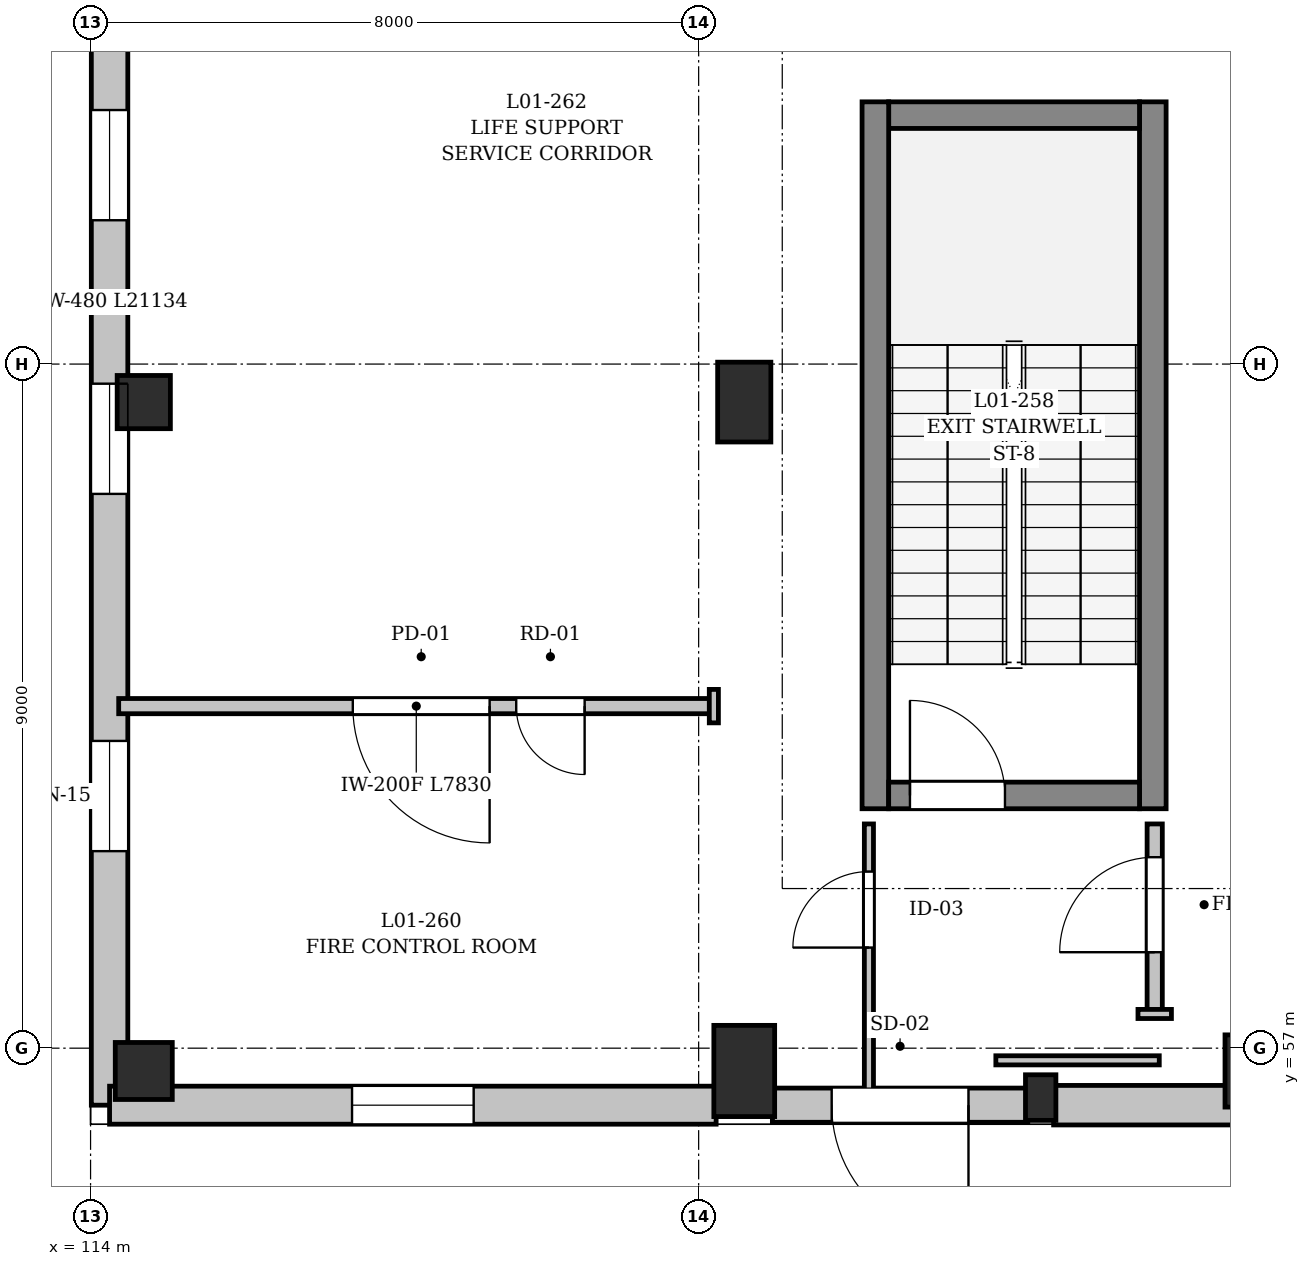
"""IFC4 building model, lengths in metres.
Left out: names, types, materials, properties, quantities, classifications, styles, units other than length and angle.
Written with IfcOpenShell. Run it as: python <this file> out.ifc"""

import sys

from ifc_helpers import new_model, si_unit, direction, frame, frame_2d, origin, origin_2d, place, context, subcontext, project, spatial, rectangle, extrude, element, fill, save


model = new_model("IFC4")
c1 = context("Model", 3, precision=1e-05, world=origin(), true_north=direction((0.0, 1.0)))
c2 = subcontext(c1, "Body", "Model", "MODEL_VIEW")
j1 = project(units=[si_unit("LENGTHUNIT", "METRE"), si_unit("PLANEANGLEUNIT", "RADIAN")], contexts=[c1])
p1 = place(None, origin())
s1 = spatial("IfcSite", under=j1, at=p1, CompositionType="ELEMENT")
p2 = place(p1, origin())
s2 = spatial("IfcBuilding", under=s1, at=p2, CompositionType="ELEMENT")
p3 = place(p2, origin())
s3 = spatial("IfcBuildingStorey", under=s2, at=p3, CompositionType="ELEMENT", Elevation=0.0)
p4 = place(p3, frame((114.7, 56.7, 0.0), z_axis=(0.0, 0.0, 1.0), x_axis=(1.0, 0.0, 0.0)))
e1 = element("IfcColumn", 1, at=p4, inside=s3, PredefinedType="COLUMN", context=c2, shape_type="SweptSolid", body=[
    extrude(rectangle(XDim=0.75, YDim=0.75, at=origin_2d()), origin(), (0.0, 0.0, 1.0), 5.05),
])
p5 = place(p3, frame((114.7, 65.5, 0.0), z_axis=(0.0, 0.0, 1.0), x_axis=(1.0, 0.0, 0.0)))
e2 = element("IfcColumn", 2, at=p5, inside=s3, PredefinedType="COLUMN", context=c2, shape_type="SweptSolid", body=[
    extrude(rectangle(XDim=0.7, YDim=0.7, at=origin_2d()), origin(), (0.0, 0.0, 1.0), 5.05),
])
p6 = place(p3, frame((122.6, 56.7, 0.0), z_axis=(0.0, 0.0, 1.0), x_axis=(1.0, 0.0, 0.0)))
e3 = element("IfcColumn", 3, at=p6, inside=s3, PredefinedType="COLUMN", context=c2, shape_type="SweptSolid", body=[
    extrude(rectangle(XDim=0.8, YDim=1.2, at=origin_2d()), origin(), (0.0, 0.0, 1.0), 5.05),
])
p7 = place(p3, frame((122.6, 65.5, 0.0), z_axis=(0.0, 0.0, 1.0), x_axis=(1.0, 0.0, 0.0)))
e4 = element("IfcColumn", 4, at=p7, inside=s3, PredefinedType="COLUMN", context=c2, shape_type="SweptSolid", body=[
    extrude(rectangle(XDim=0.7, YDim=1.05, at=origin_2d()), origin(), (0.0, 0.0, 1.0), 5.05),
])
p8 = place(p3, frame((129.4, 56.7, 0.0), z_axis=(0.0, 0.0, 1.0), x_axis=(1.0, 0.0, 0.0)))
e5 = element("IfcColumn", 5, at=p8, inside=s3, PredefinedType="COLUMN", context=c2, shape_type="SweptSolid", body=[
    extrude(rectangle(XDim=0.95, YDim=0.95, at=origin_2d()), origin(), (0.0, 0.0, 1.0), 5.05),
])
p9 = place(p3, frame((126.5, 56.35, 0.0), z_axis=(0.0, 0.0, 1.0), x_axis=(1.0, 0.0, 0.0)))
e6 = element("IfcColumn", 6, at=p9, inside=s3, PredefinedType="PILASTER", context=c2, shape_type="SweptSolid", body=[
    extrude(rectangle(XDim=0.4, YDim=0.6, at=origin_2d()), origin(), (0.0, 0.0, 1.0), 5.05),
])
p10 = place(p3, frame((114.25, 56.25, 0.0), z_axis=(0.0, 0.0, 1.0), x_axis=(0.0, 1.0, 0.0)))
e7 = element("IfcWall", 7, at=p10, inside=s3, PredefinedType="SOLIDWALL", context=c2, shape_type="SweptSolid", body=[
    extrude(rectangle(XDim=21.134, YDim=0.48, at=frame_2d((10.567, 0.0))), origin(), (0.0, 0.0, 1.0), 3.84),
])
p11 = place(p10, frame((3.342, 0.0, 0.9)))
e8 = element("IfcOpeningElement", 8, at=p11, cuts=e7, PredefinedType="OPENING", context=c2, shape_type="SweptSolid", body=[
    extrude(rectangle(XDim=1.45, YDim=1.5, at=frame_2d((0.725, 0.75))), frame((0.0, 0.25, 0.0), z_axis=(0.0, -1.0, 0.0), x_axis=(1.0, 0.0, 0.0)), (0.0, 0.0, 1.0), 0.5),
])
p12 = place(p10, frame((8.042, 0.0, 0.9)))
e9 = element("IfcOpeningElement", 9, at=p12, cuts=e7, PredefinedType="OPENING", context=c2, shape_type="SweptSolid", body=[
    extrude(rectangle(XDim=1.45, YDim=1.5, at=frame_2d((0.725, 0.75))), frame((0.0, 0.25, 0.0), z_axis=(0.0, -1.0, 0.0), x_axis=(1.0, 0.0, 0.0)), (0.0, 0.0, 1.0), 0.5),
])
p13 = place(p10, frame((11.642, 0.0, 0.9)))
e10 = element("IfcOpeningElement", 10, at=p13, cuts=e7, PredefinedType="OPENING", context=c2, shape_type="SweptSolid", body=[
    extrude(rectangle(XDim=1.45, YDim=1.5, at=frame_2d((0.725, 0.75))), frame((0.0, 0.25, 0.0), z_axis=(0.0, -1.0, 0.0), x_axis=(1.0, 0.0, 0.0)), (0.0, 0.0, 1.0), 0.5),
])
p14 = place(p10, frame((15.242, 0.0, 0.9)))
e11 = element("IfcOpeningElement", 11, at=p14, cuts=e7, PredefinedType="OPENING", context=c2, shape_type="SweptSolid", body=[
    extrude(rectangle(XDim=1.45, YDim=1.5, at=frame_2d((0.725, 0.75))), frame((0.0, 0.25, 0.0), z_axis=(0.0, -1.0, 0.0), x_axis=(1.0, 0.0, 0.0)), (0.0, 0.0, 1.0), 0.5),
])
p15 = place(p3, frame((134.03, 56.25, 0.0), z_axis=(0.0, 0.0, 1.0), x_axis=(-1.0, 0.0, 0.0)))
e12 = element("IfcWall", 12, at=p15, inside=s3, PredefinedType="SOLIDWALL", context=c2, shape_type="SweptSolid", body=[
    extrude(rectangle(XDim=7.36, YDim=0.52, at=frame_2d((3.68, 0.0))), origin(), (0.0, 0.0, 1.0), 4.04),
])
p16 = place(p3, frame((126.33, 56.25, 0.0), z_axis=(0.0, 0.0, 1.0), x_axis=(-1.0, 0.0, 0.0)))
e13 = element("IfcWall", 13, at=p16, inside=s3, PredefinedType="SOLIDWALL", context=c2, shape_type="SweptSolid", body=[
    extrude(rectangle(XDim=3.36, YDim=0.45, at=frame_2d((1.68, 0.0))), origin(), (0.0, 0.0, 1.0), 4.19),
])
p17 = place(p16, frame((0.78, 0.0, 0.0)))
e14 = element("IfcOpeningElement", 14, at=p17, cuts=e13, PredefinedType="OPENING", context=c2, shape_type="SweptSolid", body=[
    extrude(rectangle(XDim=1.8, YDim=2.4, at=frame_2d((0.9, 1.2))), frame((0.0, 0.235, 0.0), z_axis=(0.0, -1.0, 0.0), x_axis=(1.0, 0.0, 0.0)), (0.0, 0.0, 1.0), 0.47),
])
p18 = place(p3, frame((122.23, 56.25, 0.0), z_axis=(0.0, 0.0, 1.0), x_axis=(-1.0, 0.0, 0.0)))
e15 = element("IfcWall", 15, at=p18, inside=s3, PredefinedType="SOLIDWALL", context=c2, shape_type="SweptSolid", body=[
    extrude(rectangle(XDim=7.98, YDim=0.5, at=frame_2d((3.99, 0.0))), origin(), (0.0, 0.0, 1.0), 3.84),
])
p19 = place(p18, frame((3.19, 0.0, 0.9)))
e16 = element("IfcOpeningElement", 16, at=p19, cuts=e15, PredefinedType="OPENING", context=c2, shape_type="SweptSolid", body=[
    extrude(rectangle(XDim=1.6, YDim=1.6, at=frame_2d((0.8, 0.8))), frame((0.0, 0.26, 0.0), z_axis=(0.0, -1.0, 0.0), x_axis=(1.0, 0.0, 0.0)), (0.0, 0.0, 1.0), 0.52),
])
p20 = place(p3, frame((127.975, 60.15, 0.0), z_axis=(0.0, 0.0, 1.0), x_axis=(0.0, 1.0, 0.0)))
e17 = element("IfcWall", 17, at=p20, inside=s3, PredefinedType="SHEAR", context=c2, shape_type="SweptSolid", body=[
    extrude(rectangle(XDim=9.3, YDim=0.35, at=frame_2d((4.65, 0.0))), origin(), (0.0, 0.0, 1.0), 5.05),
])
p21 = place(p3, frame((127.8, 69.275, 0.0), z_axis=(0.0, 0.0, 1.0), x_axis=(-1.0, 0.0, 0.0)))
e18 = element("IfcWall", 18, at=p21, inside=s3, PredefinedType="SHEAR", context=c2, shape_type="SweptSolid", body=[
    extrude(rectangle(XDim=3.3, YDim=0.35, at=frame_2d((1.65, 0.0))), origin(), (0.0, 0.0, 1.0), 5.05),
])
p22 = place(p3, frame((124.325, 69.45, 0.0), z_axis=(0.0, 0.0, 1.0), x_axis=(0.0, -1.0, 0.0)))
e19 = element("IfcWall", 19, at=p22, inside=s3, PredefinedType="SHEAR", context=c2, shape_type="SweptSolid", body=[
    extrude(rectangle(XDim=9.3, YDim=0.35, at=frame_2d((4.65, 0.0))), origin(), (0.0, 0.0, 1.0), 5.05),
])
p23 = place(p3, frame((124.5, 60.325, 0.0), z_axis=(0.0, 0.0, 1.0), x_axis=(1.0, 0.0, 0.0)))
e20 = element("IfcWall", 20, at=p23, inside=s3, PredefinedType="SHEAR", context=c2, shape_type="SweptSolid", body=[
    extrude(rectangle(XDim=3.3, YDim=0.35, at=frame_2d((1.65, 0.0))), origin(), (0.0, 0.0, 1.0), 5.05),
])
p24 = place(p23, frame((0.28, 0.0, 0.0)))
e21 = element("IfcOpeningElement", 21, at=p24, cuts=e20, PredefinedType="OPENING", context=c2, shape_type="SweptSolid", body=[
    extrude(rectangle(XDim=1.25, YDim=2.2, at=frame_2d((0.625, 1.1))), frame((0.0, 0.185, 0.0), z_axis=(0.0, -1.0, 0.0), x_axis=(1.0, 0.0, 0.0)), (0.0, 0.0, 1.0), 0.37),
])
p25 = place(p3, frame((128.0, 57.45, 0.0), z_axis=(0.0, 0.0, 1.0), x_axis=(0.0, 1.0, 0.0)))
e22 = element("IfcWall", 22, at=p25, inside=s3, PredefinedType="PARTITIONING", context=c2, shape_type="SweptSolid", body=[
    extrude(rectangle(XDim=2.5, YDim=0.2, at=frame_2d((1.25, 0.0))), origin(), (0.0, 0.0, 1.0), 5.05),
])
p26 = place(p25, frame((0.812, 0.0, 0.0)))
e23 = element("IfcOpeningElement", 23, at=p26, cuts=e22, PredefinedType="OPENING", context=c2, shape_type="SweptSolid", body=[
    extrude(rectangle(XDim=1.25, YDim=2.2, at=frame_2d((0.625, 1.1))), frame((0.0, 0.11, 0.0), z_axis=(0.0, -1.0, 0.0), x_axis=(1.0, 0.0, 0.0)), (0.0, 0.0, 1.0), 0.22),
])
p27 = place(p3, frame((122.2, 61.5, 0.0), z_axis=(0.0, 0.0, 1.0), x_axis=(-1.0, 0.0, 0.0)))
e24 = element("IfcWall", 24, at=p27, inside=s3, PredefinedType="PARTITIONING", context=c2, shape_type="SweptSolid", body=[
    extrude(rectangle(XDim=7.83, YDim=0.2, at=frame_2d((3.915, 0.0))), origin(), (0.0, 0.0, 1.0), 4.34),
])
p28 = place(p27, frame((2.95, 0.0, 0.0)))
e25 = element("IfcOpeningElement", 25, at=p28, cuts=e24, PredefinedType="OPENING", context=c2, shape_type="SweptSolid", body=[
    extrude(rectangle(XDim=1.8, YDim=2.3, at=frame_2d((0.9, 1.15))), frame((0.0, 0.11, 0.0), z_axis=(0.0, -1.0, 0.0), x_axis=(1.0, 0.0, 0.0)), (0.0, 0.0, 1.0), 0.22),
])
p29 = place(p27, frame((1.7, 0.0, 0.0)))
e26 = element("IfcOpeningElement", 26, at=p29, cuts=e24, PredefinedType="OPENING", context=c2, shape_type="SweptSolid", body=[
    extrude(rectangle(XDim=0.9, YDim=2.1, at=frame_2d((0.45, 1.05))), frame((0.0, 0.11, 0.0), z_axis=(0.0, -1.0, 0.0), x_axis=(1.0, 0.0, 0.0)), (0.0, 0.0, 1.0), 0.22),
])
p30 = place(p3, frame((124.24, 56.37, 0.0), z_axis=(0.0, 0.0, 1.0), x_axis=(0.0, 1.0, 0.0)))
e27 = element("IfcWall", 27, at=p30, inside=s3, PredefinedType="PARTITIONING", context=c2, shape_type="SweptSolid", body=[
    extrude(rectangle(XDim=3.58, YDim=0.12, at=frame_2d((1.79, 0.0))), origin(), (0.0, 0.0, 1.0), 5.05),
])
p31 = place(p30, frame((1.954, 0.0, 0.0)))
e28 = element("IfcOpeningElement", 28, at=p31, cuts=e27, PredefinedType="OPENING", context=c2, shape_type="SweptSolid", body=[
    extrude(rectangle(XDim=1.0, YDim=2.2, at=frame_2d((0.5, 1.1))), frame((0.0, 0.07, 0.0), z_axis=(0.0, -1.0, 0.0), x_axis=(1.0, 0.0, 0.0)), (0.0, 0.0, 1.0), 0.14),
])
p32 = place(p3, frame((128.06, 56.84, 0.0), z_axis=(0.0, 0.0, 1.0), x_axis=(-1.0, 0.0, 0.0)))
e29 = element("IfcWall", 29, at=p32, inside=s3, PredefinedType="PARTITIONING", context=c2, shape_type="SweptSolid", body=[
    extrude(rectangle(XDim=2.15, YDim=0.12, at=frame_2d((1.075, 0.0))), origin(), (0.0, 0.0, 1.0), 4.19),
])
for number, where, z_axis, x_axis in (
    (30, (128.22, 57.45, 0.0), (0.0, 0.0, 1.0), (-1.0, 0.0, 0.0)),
    (31, (122.2, 61.72, 0.0), (0.0, 0.0, 1.0), (0.0, -1.0, 0.0)),
):
    element("IfcWall", number, at=place(p3, frame(where, z_axis=z_axis, x_axis=x_axis)), inside=s3, PredefinedType="PARTITIONING", context=c2, shape_type="SweptSolid", body=[
        extrude(rectangle(XDim=0.44, YDim=0.12, at=frame_2d((0.22, 0.0))), origin(), (0.0, 0.0, 1.0), 5.05),
    ])
p33 = place(p11, origin())
e32 = element("IfcWindow", 32, at=p33, inside=s3, PartitioningType="DOUBLE_PANEL_VERTICAL", PredefinedType="WINDOW", context=c2, shape_type="SweptSolid", body=[
    extrude(rectangle(XDim=1.45, YDim=1.5, at=frame_2d((0.725, 0.75))), frame((0.0, 0.03, 0.0), z_axis=(0.0, -1.0, 0.0), x_axis=(1.0, 0.0, 0.0)), (0.0, 0.0, 1.0), 0.06),
])
fill(e8, e32)
p34 = place(p12, origin())
e33 = element("IfcWindow", 33, at=p34, inside=s3, PartitioningType="DOUBLE_PANEL_VERTICAL", PredefinedType="WINDOW", context=c2, shape_type="SweptSolid", body=[
    extrude(rectangle(XDim=1.45, YDim=1.5, at=frame_2d((0.725, 0.75))), frame((0.0, 0.03, 0.0), z_axis=(0.0, -1.0, 0.0), x_axis=(1.0, 0.0, 0.0)), (0.0, 0.0, 1.0), 0.06),
])
fill(e9, e33)
p35 = place(p13, origin())
e34 = element("IfcWindow", 34, at=p35, inside=s3, PartitioningType="DOUBLE_PANEL_VERTICAL", PredefinedType="WINDOW", context=c2, shape_type="SweptSolid", body=[
    extrude(rectangle(XDim=1.45, YDim=1.5, at=frame_2d((0.725, 0.75))), frame((0.0, 0.03, 0.0), z_axis=(0.0, -1.0, 0.0), x_axis=(1.0, 0.0, 0.0)), (0.0, 0.0, 1.0), 0.06),
])
fill(e10, e34)
p36 = place(p19, origin())
e35 = element("IfcWindow", 35, at=p36, inside=s3, PartitioningType="DOUBLE_PANEL_VERTICAL", PredefinedType="WINDOW", context=c2, shape_type="SweptSolid", body=[
    extrude(rectangle(XDim=1.6, YDim=1.6, at=frame_2d((0.8, 0.8))), frame((0.0, 0.03, 0.0), z_axis=(0.0, -1.0, 0.0), x_axis=(1.0, 0.0, 0.0)), (0.0, 0.0, 1.0), 0.06),
])
fill(e16, e35)
p37 = place(p17, origin())
e36 = element("IfcDoor", 36, at=p37, inside=s3, OperationType="DOUBLE_DOOR_SINGLE_SWING", PredefinedType="DOOR", context=c2, shape_type="SweptSolid", body=[
    extrude(rectangle(XDim=1.8, YDim=2.4, at=frame_2d((0.9, 1.2))), frame((0.0, 0.025, 0.0), z_axis=(0.0, -1.0, 0.0), x_axis=(1.0, 0.0, 0.0)), (0.0, 0.0, 1.0), 0.05),
])
fill(e14, e36)
p38 = place(p24, origin())
e37 = element("IfcDoor", 37, at=p38, inside=s3, OperationType="SINGLE_SWING_RIGHT", PredefinedType="DOOR", context=c2, shape_type="SweptSolid", body=[
    extrude(rectangle(XDim=1.25, YDim=2.2, at=frame_2d((0.625, 1.1))), frame((0.0, 0.025, 0.0), z_axis=(0.0, -1.0, 0.0), x_axis=(1.0, 0.0, 0.0)), (0.0, 0.0, 1.0), 0.05),
])
fill(e21, e37)
p39 = place(p26, origin())
e38 = element("IfcDoor", 38, at=p39, inside=s3, OperationType="SINGLE_SWING_LEFT", PredefinedType="DOOR", context=c2, shape_type="SweptSolid", body=[
    extrude(rectangle(XDim=1.25, YDim=2.2, at=frame_2d((0.625, 1.1))), frame((0.0, 0.025, 0.0), z_axis=(0.0, -1.0, 0.0), x_axis=(1.0, 0.0, 0.0)), (0.0, 0.0, 1.0), 0.05),
])
fill(e23, e38)
p40 = place(p28, origin())
e39 = element("IfcDoor", 39, at=p40, inside=s3, OperationType="DOUBLE_DOOR_SINGLE_SWING", PredefinedType="DOOR", context=c2, shape_type="SweptSolid", body=[
    extrude(rectangle(XDim=1.8, YDim=2.3, at=frame_2d((0.9, 1.15))), frame((0.0, 0.025, 0.0), z_axis=(0.0, -1.0, 0.0), x_axis=(1.0, 0.0, 0.0)), (0.0, 0.0, 1.0), 0.05),
])
fill(e25, e39)
p41 = place(p31, origin())
e40 = element("IfcDoor", 40, at=p41, inside=s3, OperationType="SINGLE_SWING_LEFT", PredefinedType="DOOR", context=c2, shape_type="SweptSolid", body=[
    extrude(rectangle(XDim=1.0, YDim=2.2, at=frame_2d((0.5, 1.1))), frame((0.0, 0.025, 0.0), z_axis=(0.0, -1.0, 0.0), x_axis=(1.0, 0.0, 0.0)), (0.0, 0.0, 1.0), 0.05),
])
fill(e28, e40)
p42 = place(p29, origin())
e41 = element("IfcDoor", 41, at=p42, inside=s3, OperationType="SINGLE_SWING_RIGHT", PredefinedType="DOOR", context=c2, shape_type="SweptSolid", body=[
    extrude(rectangle(XDim=0.9, YDim=2.1, at=frame_2d((0.45, 1.05))), frame((0.0, 0.025, 0.0), z_axis=(0.0, -1.0, 0.0), x_axis=(1.0, 0.0, 0.0)), (0.0, 0.0, 1.0), 0.05),
])
fill(e26, e41)
save(model, sys.argv[1])
